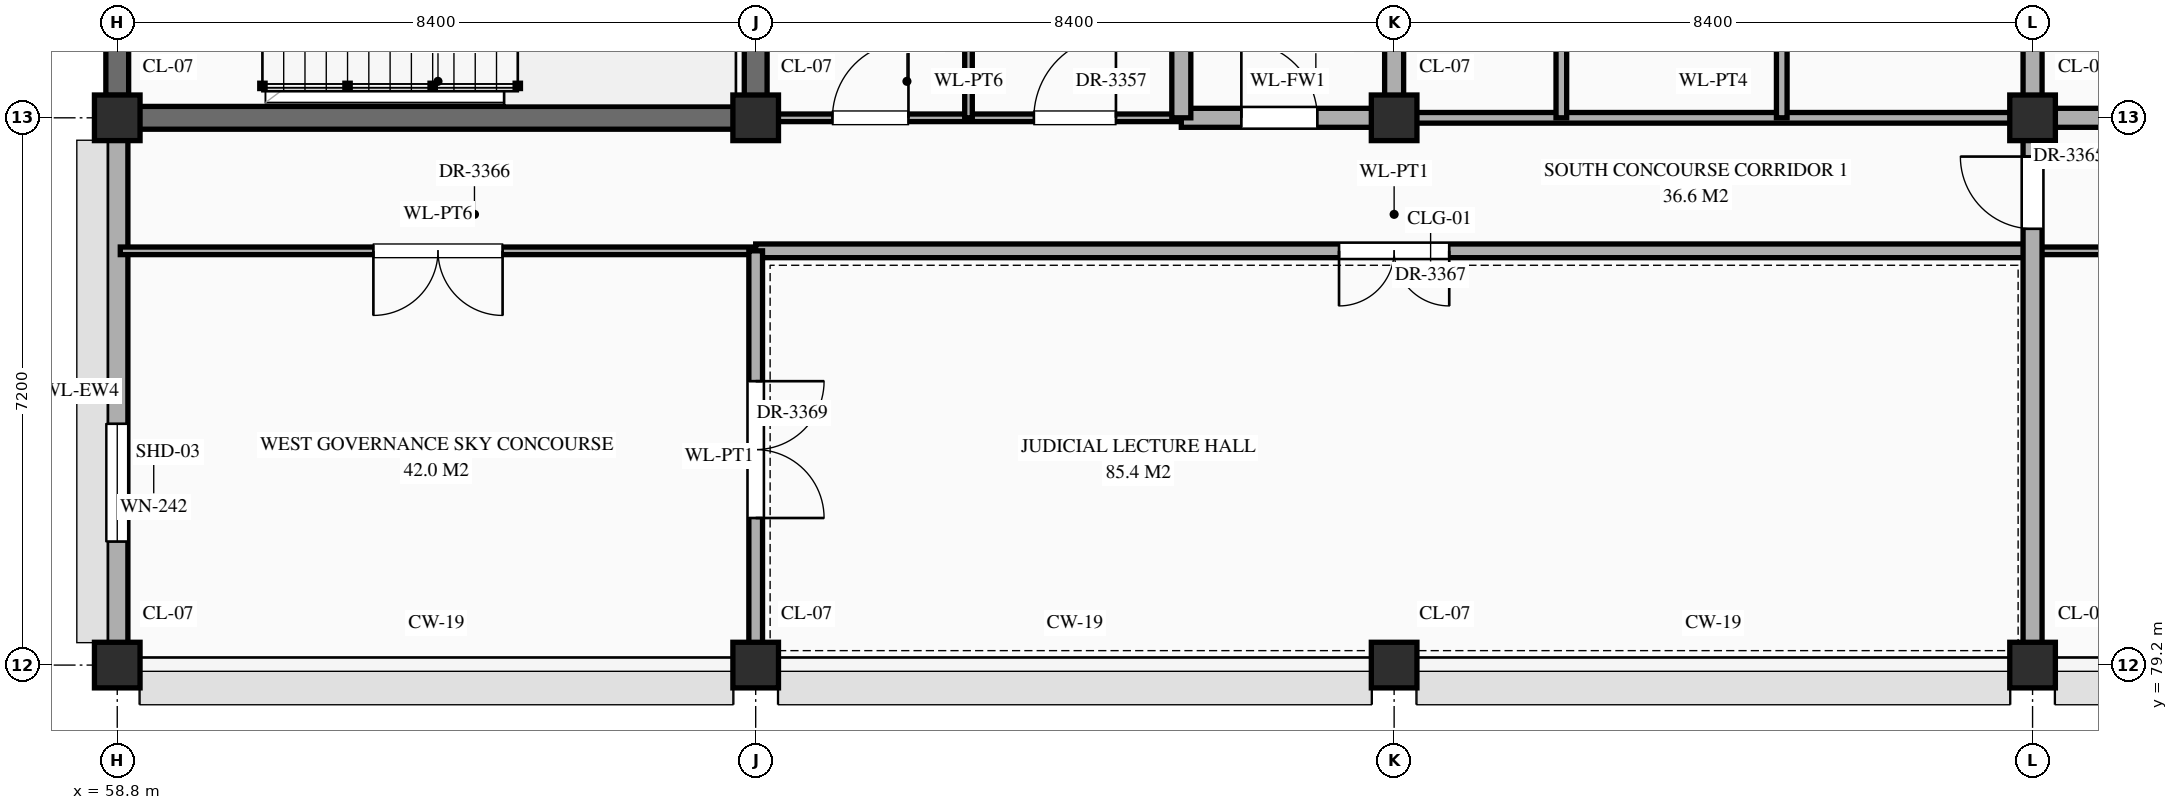
"""IFC4 building model, lengths in metres.
Left out: names, types, materials, properties, quantities, classifications, styles, units other than length and angle.
Written with IfcOpenShell. Run it as: python <this file> out.ifc"""

import sys

from ifc_helpers import new_model, si_unit, direction, frame, frame_2d, origin, origin_2d, place, context, subcontext, project, spatial, rectangle, extrude, element, fill, save


model = new_model("IFC4")
c1 = context("Model", 3, precision=1e-05, world=origin(), true_north=direction((0.0, 1.0)))
c2 = subcontext(c1, "Body", "Model", "MODEL_VIEW")
j1 = project(units=[si_unit("LENGTHUNIT", "METRE"), si_unit("PLANEANGLEUNIT", "RADIAN")], contexts=[c1])
p1 = place(None, origin())
s1 = spatial("IfcSite", under=j1, at=p1, CompositionType="ELEMENT")
p2 = place(p1, origin())
s2 = spatial("IfcBuilding", under=s1, at=p2, CompositionType="ELEMENT")
p3 = place(p2, frame((0.0, 0.0, 64.5)))
s3 = spatial("IfcBuildingStorey", under=s2, at=p3, CompositionType="ELEMENT", Elevation=64.5)
for number, where, z_axis, x_axis in (
    (1, (58.8, 79.2, 0.0), (0.0, 0.0, 1.0), (1.0, 0.0, 0.0)),
    (2, (58.8, 86.4, 0.0), (0.0, 0.0, 1.0), (1.0, 0.0, 0.0)),
    (3, (67.2, 79.2, 0.0), (0.0, 0.0, 1.0), (1.0, 0.0, 0.0)),
    (4, (67.2, 86.4, 0.0), (0.0, 0.0, 1.0), (1.0, 0.0, 0.0)),
    (5, (75.6, 79.2, 0.0), (0.0, 0.0, 1.0), (1.0, 0.0, 0.0)),
    (6, (75.6, 86.4, 0.0), (0.0, 0.0, 1.0), (1.0, 0.0, 0.0)),
    (7, (84.0, 79.2, 0.0), (0.0, 0.0, 1.0), (1.0, 0.0, 0.0)),
    (8, (84.0, 86.4, 0.0), (0.0, 0.0, 1.0), (1.0, 0.0, 0.0)),
):
    element("IfcColumn", number, at=place(p3, frame(where, z_axis=z_axis, x_axis=x_axis)), inside=s3, PredefinedType="COLUMN", context=c2, shape_type="SweptSolid", body=[
        extrude(rectangle(XDim=0.6, YDim=0.6, at=origin_2d()), origin(), (0.0, 0.0, 1.0), 4.2),
    ])
p4 = place(p3, frame((58.8, 79.495, 0.0), z_axis=(0.0, 0.0, 1.0), x_axis=(0.0, 1.0, 0.0)))
e9 = element("IfcWall", 9, at=p4, inside=s3, PredefinedType="STANDARD", context=c2, shape_type="SweptSolid", body=[
    extrude(rectangle(XDim=6.61, YDim=0.28, at=frame_2d((3.305, 0.0))), origin(), (0.0, 0.0, 1.0), 3.2),
])
p5 = place(p4, frame((1.33, 0.0, 0.85)))
e10 = element("IfcOpeningElement", 10, at=p5, cuts=e9, PredefinedType="OPENING", context=c2, shape_type="SweptSolid", body=[
    extrude(rectangle(XDim=1.55, YDim=1.38, at=frame_2d((0.775, 0.69))), frame((0.0, 0.152, 0.0), z_axis=(0.0, -1.0, 0.0), x_axis=(1.0, 0.0, 0.0)), (0.0, 0.0, 1.0), 0.304),
])
p6 = place(p3, frame((58.8, 86.695, 0.0), z_axis=(0.0, 0.0, 1.0), x_axis=(0.0, 1.0, 0.0)))
e11 = element("IfcWall", 11, at=p6, inside=s3, PredefinedType="SHEAR", context=c2, shape_type="SweptSolid", body=[
    extrude(rectangle(XDim=6.61, YDim=0.3, at=frame_2d((3.305, 0.0))), origin(), (0.0, 0.0, 1.0), 3.95),
])
p7 = place(p3, frame((58.84, 84.65, 0.0), z_axis=(0.0, 0.0, 1.0), x_axis=(1.0, 0.0, 0.0)))
e12 = element("IfcWall", 12, at=p7, inside=s3, PredefinedType="STANDARD", context=c2, shape_type="SweptSolid", body=[
    extrude(rectangle(XDim=8.36, YDim=0.1, at=frame_2d((4.18, 0.0))), origin(), (0.0, 0.0, 1.0), 3.85),
])
p8 = place(p7, frame((3.33, 0.0, 0.0)))
e13 = element("IfcOpeningElement", 13, at=p8, cuts=e12, PredefinedType="OPENING", context=c2, shape_type="SweptSolid", body=[
    extrude(rectangle(XDim=1.7, YDim=2.45, at=frame_2d((0.85, 1.225))), frame((0.0, 0.062, 0.0), z_axis=(0.0, -1.0, 0.0), x_axis=(1.0, 0.0, 0.0)), (0.0, 0.0, 1.0), 0.124),
])
p9 = place(p3, frame((67.2, 84.65, 0.0), z_axis=(0.0, 0.0, 1.0), x_axis=(1.0, 0.0, 0.0)))
e14 = element("IfcWall", 14, at=p9, inside=s3, PredefinedType="STANDARD", context=c2, shape_type="SweptSolid", body=[
    extrude(rectangle(XDim=16.8, YDim=0.18, at=frame_2d((8.4, 0.0))), origin(), (0.0, 0.0, 1.0), 3.85),
])
p10 = place(p9, frame((7.675, 0.0, 0.0)))
e15 = element("IfcOpeningElement", 15, at=p10, cuts=e14, PredefinedType="OPENING", context=c2, shape_type="SweptSolid", body=[
    extrude(rectangle(XDim=1.45, YDim=2.3, at=frame_2d((0.725, 1.15))), frame((0.0, 0.102, 0.0), z_axis=(0.0, -1.0, 0.0), x_axis=(1.0, 0.0, 0.0)), (0.0, 0.0, 1.0), 0.204),
])
p11 = place(p3, frame((84.0, 84.65, 0.0), z_axis=(0.0, 0.0, 1.0), x_axis=(1.0, 0.0, 0.0)))
e16 = element("IfcWall", 16, at=p11, inside=s3, PredefinedType="STANDARD", context=c2, shape_type="SweptSolid", body=[
    extrude(rectangle(XDim=25.16, YDim=0.1, at=frame_2d((12.58, 0.0))), origin(), (0.0, 0.0, 1.0), 3.85),
])
p12 = place(p11, frame((11.63, 0.0, 0.0)))
e17 = element("IfcOpeningElement", 17, at=p12, cuts=e16, PredefinedType="OPENING", context=c2, shape_type="SweptSolid", body=[
    extrude(rectangle(XDim=1.9, YDim=2.5, at=frame_2d((0.95, 1.25))), frame((0.0, 0.062, 0.0), z_axis=(0.0, -1.0, 0.0), x_axis=(1.0, 0.0, 0.0)), (0.0, 0.0, 1.0), 0.124),
])
p13 = place(p3, frame((58.84, 86.4, 0.0), z_axis=(0.0, 0.0, 1.0), x_axis=(1.0, 0.0, 0.0)))
e18 = element("IfcWall", 18, at=p13, inside=s3, PredefinedType="SHEAR", context=c2, shape_type="SweptSolid", body=[
    extrude(rectangle(XDim=8.36, YDim=0.3, at=frame_2d((4.18, 0.0))), origin(), (0.0, 0.0, 1.0), 3.85),
])
p14 = place(p3, frame((67.2, 86.4, 0.0), z_axis=(0.0, 0.0, 1.0), x_axis=(1.0, 0.0, 0.0)))
e19 = element("IfcWall", 19, at=p14, inside=s3, PredefinedType="STANDARD", context=c2, shape_type="SweptSolid", body=[
    extrude(rectangle(XDim=5.6, YDim=0.1, at=frame_2d((2.8, 0.0))), origin(), (0.0, 0.0, 1.0), 3.0),
])
p15 = place(p14, frame((1.01, 0.0, 0.0)))
e20 = element("IfcOpeningElement", 20, at=p15, cuts=e19, PredefinedType="OPENING", context=c2, shape_type="SweptSolid", body=[
    extrude(rectangle(XDim=1.0, YDim=2.25, at=frame_2d((0.5, 1.125))), frame((0.0, 0.062, 0.0), z_axis=(0.0, -1.0, 0.0), x_axis=(1.0, 0.0, 0.0)), (0.0, 0.0, 1.0), 0.124),
])
p16 = place(p14, frame((3.66, 0.0, 0.0)))
e21 = element("IfcOpeningElement", 21, at=p16, cuts=e19, PredefinedType="OPENING", context=c2, shape_type="SweptSolid", body=[
    extrude(rectangle(XDim=1.08, YDim=2.25, at=frame_2d((0.54, 1.125))), frame((0.0, 0.062, 0.0), z_axis=(0.0, -1.0, 0.0), x_axis=(1.0, 0.0, 0.0)), (0.0, 0.0, 1.0), 0.124),
])
p17 = place(p3, frame((72.8, 86.4, 0.0), z_axis=(0.0, 0.0, 1.0), x_axis=(1.0, 0.0, 0.0)))
e22 = element("IfcWall", 22, at=p17, inside=s3, PredefinedType="STANDARD", context=c2, shape_type="SweptSolid", body=[
    extrude(rectangle(XDim=2.8, YDim=0.25, at=frame_2d((1.4, 0.0))), origin(), (0.0, 0.0, 1.0), 3.0),
])
p18 = place(p17, frame((0.79, 0.0, 0.0)))
e23 = element("IfcOpeningElement", 23, at=p18, cuts=e22, PredefinedType="OPENING", context=c2, shape_type="SweptSolid", body=[
    extrude(rectangle(XDim=1.0, YDim=2.2, at=frame_2d((0.5, 1.1))), frame((0.0, 0.137, 0.0), z_axis=(0.0, -1.0, 0.0), x_axis=(1.0, 0.0, 0.0)), (0.0, 0.0, 1.0), 0.274),
])
p19 = place(p3, frame((75.6, 86.4, 0.0), z_axis=(0.0, 0.0, 1.0), x_axis=(1.0, 0.0, 0.0)))
e24 = element("IfcWall", 24, at=p19, inside=s3, PredefinedType="STANDARD", context=c2, shape_type="SweptSolid", body=[
    extrude(rectangle(XDim=8.4, YDim=0.14, at=frame_2d((4.2, 0.0))), origin(), (0.0, 0.0, 1.0), 3.0),
])
p20 = place(p3, frame((84.0, 86.4, 0.0), z_axis=(0.0, 0.0, 1.0), x_axis=(1.0, 0.0, 0.0)))
e25 = element("IfcWall", 25, at=p20, inside=s3, PredefinedType="STANDARD", context=c2, shape_type="SweptSolid", body=[
    extrude(rectangle(XDim=8.4, YDim=0.25, at=frame_2d((4.2, 0.0))), origin(), (0.0, 0.0, 1.0), 3.0),
])
p21 = place(p20, frame((3.725, 0.0, 0.0)))
e26 = element("IfcOpeningElement", 26, at=p21, cuts=e25, PredefinedType="OPENING", context=c2, shape_type="SweptSolid", body=[
    extrude(rectangle(XDim=0.95, YDim=2.15, at=frame_2d((0.475, 1.075))), frame((0.0, 0.137, 0.0), z_axis=(0.0, -1.0, 0.0), x_axis=(1.0, 0.0, 0.0)), (0.0, 0.0, 1.0), 0.274),
])
p22 = place(p3, frame((67.2, 79.24, 0.0), z_axis=(0.0, 0.0, 1.0), x_axis=(0.0, 1.0, 0.0)))
e27 = element("IfcWall", 27, at=p22, inside=s3, PredefinedType="STANDARD", context=c2, shape_type="SweptSolid", body=[
    extrude(rectangle(XDim=5.41, YDim=0.18, at=frame_2d((2.705, 0.0))), origin(), (0.0, 0.0, 1.0), 3.1),
])
p23 = place(p22, frame((1.895, 0.0, 0.0)))
e28 = element("IfcOpeningElement", 28, at=p23, cuts=e27, PredefinedType="OPENING", context=c2, shape_type="SweptSolid", body=[
    extrude(rectangle(XDim=1.8, YDim=2.5, at=frame_2d((0.9, 1.25))), frame((0.0, 0.102, 0.0), z_axis=(0.0, -1.0, 0.0), x_axis=(1.0, 0.0, 0.0)), (0.0, 0.0, 1.0), 0.204),
])
p24 = place(p3, frame((67.2, 86.4, 0.0), z_axis=(0.0, 0.0, 1.0), x_axis=(0.0, 1.0, 0.0)))
e29 = element("IfcWall", 29, at=p24, inside=s3, PredefinedType="SHEAR", context=c2, shape_type="SweptSolid", body=[
    extrude(rectangle(XDim=4.8, YDim=0.3, at=frame_2d((2.4, 0.0))), origin(), (0.0, 0.0, 1.0), 3.95),
])
p25 = place(p3, frame((70.0, 86.4, 0.0), z_axis=(0.0, 0.0, 1.0), x_axis=(0.0, 1.0, 0.0)))
e30 = element("IfcWall", 30, at=p25, inside=s3, PredefinedType="STANDARD", context=c2, shape_type="SweptSolid", body=[
    extrude(rectangle(XDim=7.2, YDim=0.1, at=frame_2d((3.6, 0.0))), origin(), (0.0, 0.0, 1.0), 3.95),
])
p26 = place(p25, frame((3.12, 0.0, 0.0)))
e31 = element("IfcOpeningElement", 31, at=p26, cuts=e30, PredefinedType="OPENING", context=c2, shape_type="SweptSolid", body=[
    extrude(rectangle(XDim=0.96, YDim=2.2, at=frame_2d((0.48, 1.1))), frame((0.0, 0.062, 0.0), z_axis=(0.0, -1.0, 0.0), x_axis=(1.0, 0.0, 0.0)), (0.0, 0.0, 1.0), 0.124),
])
p27 = place(p3, frame((72.8, 86.4, 0.0), z_axis=(0.0, 0.0, 1.0), x_axis=(0.0, 1.0, 0.0)))
e32 = element("IfcWall", 32, at=p27, inside=s3, PredefinedType="STANDARD", context=c2, shape_type="SweptSolid", body=[
    extrude(rectangle(XDim=7.2, YDim=0.25, at=frame_2d((3.6, 0.0))), origin(), (0.0, 0.0, 1.0), 3.95),
])
p28 = place(p27, frame((3.125, 0.0, 0.0)))
e33 = element("IfcOpeningElement", 33, at=p28, cuts=e32, PredefinedType="OPENING", context=c2, shape_type="SweptSolid", body=[
    extrude(rectangle(XDim=0.95, YDim=2.15, at=frame_2d((0.475, 1.075))), frame((0.0, 0.137, 0.0), z_axis=(0.0, -1.0, 0.0), x_axis=(1.0, 0.0, 0.0)), (0.0, 0.0, 1.0), 0.274),
])
p29 = place(p3, frame((75.6, 86.4, 0.0), z_axis=(0.0, 0.0, 1.0), x_axis=(0.0, 1.0, 0.0)))
e34 = element("IfcWall", 34, at=p29, inside=s3, PredefinedType="STANDARD", context=c2, shape_type="SweptSolid", body=[
    extrude(rectangle(XDim=7.2, YDim=0.25, at=frame_2d((3.6, 0.0))), origin(), (0.0, 0.0, 1.0), 3.2),
])
p30 = place(p29, frame((5.34, 0.0, 0.0)))
e35 = element("IfcOpeningElement", 35, at=p30, cuts=e34, PredefinedType="OPENING", context=c2, shape_type="SweptSolid", body=[
    extrude(rectangle(XDim=1.1, YDim=2.2, at=frame_2d((0.55, 1.1))), frame((0.0, 0.137, 0.0), z_axis=(0.0, -1.0, 0.0), x_axis=(1.0, 0.0, 0.0)), (0.0, 0.0, 1.0), 0.274),
])
for number, where, z_axis, x_axis in (
    (36, (77.8, 86.4, 0.0), (0.0, 0.0, 1.0), (0.0, 1.0, 0.0)),
    (37, (80.7, 86.4, 0.0), (0.0, 0.0, 1.0), (0.0, 1.0, 0.0)),
):
    element("IfcWall", number, at=place(p3, frame(where, z_axis=z_axis, x_axis=x_axis)), inside=s3, PredefinedType="STANDARD", context=c2, shape_type="SweptSolid", body=[
        extrude(rectangle(XDim=4.8, YDim=0.14, at=frame_2d((2.4, 0.0))), origin(), (0.0, 0.0, 1.0), 3.95),
    ])
p31 = place(p3, frame((84.0, 79.24, 0.0), z_axis=(0.0, 0.0, 1.0), x_axis=(0.0, 1.0, 0.0)))
e38 = element("IfcWall", 38, at=p31, inside=s3, PredefinedType="STANDARD", context=c2, shape_type="SweptSolid", body=[
    extrude(rectangle(XDim=25.16, YDim=0.25, at=frame_2d((12.58, 0.0))), origin(), (0.0, 0.0, 1.0), 3.1),
])
p32 = place(p31, frame((22.72, 0.0, 0.0)))
e39 = element("IfcOpeningElement", 39, at=p32, cuts=e38, PredefinedType="OPENING", context=c2, shape_type="SweptSolid", body=[
    extrude(rectangle(XDim=1.5, YDim=2.25, at=frame_2d((0.75, 1.125))), frame((0.0, 0.137, 0.0), z_axis=(0.0, -1.0, 0.0), x_axis=(1.0, 0.0, 0.0)), (0.0, 0.0, 1.0), 0.274),
])
p33 = place(p31, frame((12.55, 0.0, 0.0)))
e40 = element("IfcOpeningElement", 40, at=p33, cuts=e38, PredefinedType="OPENING", context=c2, shape_type="SweptSolid", body=[
    extrude(rectangle(XDim=1.0, YDim=2.2, at=frame_2d((0.5, 1.1))), frame((0.0, 0.137, 0.0), z_axis=(0.0, -1.0, 0.0), x_axis=(1.0, 0.0, 0.0)), (0.0, 0.0, 1.0), 0.274),
])
p34 = place(p31, frame((14.87, 0.0, 0.0)))
e41 = element("IfcOpeningElement", 41, at=p34, cuts=e38, PredefinedType="OPENING", context=c2, shape_type="SweptSolid", body=[
    extrude(rectangle(XDim=0.95, YDim=2.15, at=frame_2d((0.475, 1.075))), frame((0.0, 0.137, 0.0), z_axis=(0.0, -1.0, 0.0), x_axis=(1.0, 0.0, 0.0)), (0.0, 0.0, 1.0), 0.274),
])
p35 = place(p31, frame((5.7, 0.0, 0.0)))
e42 = element("IfcOpeningElement", 42, at=p35, cuts=e38, PredefinedType="OPENING", context=c2, shape_type="SweptSolid", body=[
    extrude(rectangle(XDim=0.95, YDim=2.15, at=frame_2d((0.475, 1.075))), frame((0.0, 0.137, 0.0), z_axis=(0.0, -1.0, 0.0), x_axis=(1.0, 0.0, 0.0)), (0.0, 0.0, 1.0), 0.274),
])
p36 = place(p5, origin())
e43 = element("IfcWindow", 43, at=p36, inside=s3, PartitioningType="SINGLE_PANEL", PredefinedType="WINDOW", context=c2, shape_type="SweptSolid", body=[
    extrude(rectangle(XDim=1.55, YDim=1.38, at=frame_2d((0.775, 0.69))), frame((0.0, 0.03, 0.0), z_axis=(0.0, -1.0, 0.0), x_axis=(1.0, 0.0, 0.0)), (0.0, 0.0, 1.0), 0.06),
])
fill(e10, e43)
p37 = place(p15, origin())
e44 = element("IfcDoor", 44, at=p37, inside=s3, OperationType="SINGLE_SWING_RIGHT", PredefinedType="DOOR", context=c2, shape_type="SweptSolid", body=[
    extrude(rectangle(XDim=1.0, YDim=2.25, at=frame_2d((0.5, 1.125))), frame((0.0, 0.025, 0.0), z_axis=(0.0, -1.0, 0.0), x_axis=(1.0, 0.0, 0.0)), (0.0, 0.0, 1.0), 0.05),
])
fill(e20, e44)
p38 = place(p16, origin())
e45 = element("IfcDoor", 45, at=p38, inside=s3, OperationType="SINGLE_SWING_RIGHT", PredefinedType="DOOR", context=c2, shape_type="SweptSolid", body=[
    extrude(rectangle(XDim=1.08, YDim=2.25, at=frame_2d((0.54, 1.125))), frame((0.0, 0.025, 0.0), z_axis=(0.0, -1.0, 0.0), x_axis=(1.0, 0.0, 0.0)), (0.0, 0.0, 1.0), 0.05),
])
fill(e21, e45)
p39 = place(p18, origin())
e46 = element("IfcDoor", 46, at=p39, inside=s3, OperationType="SINGLE_SWING_LEFT", PredefinedType="DOOR", context=c2, shape_type="SweptSolid", body=[
    extrude(rectangle(XDim=1.0, YDim=2.2, at=frame_2d((0.5, 1.1))), frame((0.0, 0.025, 0.0), z_axis=(0.0, -1.0, 0.0), x_axis=(1.0, 0.0, 0.0)), (0.0, 0.0, 1.0), 0.05),
])
fill(e23, e46)
p40 = place(p35, origin())
e47 = element("IfcDoor", 47, at=p40, inside=s3, OperationType="SINGLE_SWING_RIGHT", PredefinedType="DOOR", context=c2, shape_type="SweptSolid", body=[
    extrude(rectangle(XDim=0.95, YDim=2.15, at=frame_2d((0.475, 1.075))), frame((0.0, 0.025, 0.0), z_axis=(0.0, -1.0, 0.0), x_axis=(1.0, 0.0, 0.0)), (0.0, 0.0, 1.0), 0.05),
])
fill(e42, e47)
p41 = place(p8, frame((1.7, 0.0, 0.0), z_axis=(0.0, 0.0, 1.0), x_axis=(-1.0, 0.0, 0.0)))
e48 = element("IfcDoor", 48, at=p41, inside=s3, OperationType="DOUBLE_DOOR_SINGLE_SWING", PredefinedType="DOOR", context=c2, shape_type="SweptSolid", body=[
    extrude(rectangle(XDim=1.7, YDim=2.45, at=frame_2d((0.85, 1.225))), frame((0.0, 0.025, 0.0), z_axis=(0.0, -1.0, 0.0), x_axis=(1.0, 0.0, 0.0)), (0.0, 0.0, 1.0), 0.05),
])
fill(e13, e48)
p42 = place(p10, frame((1.45, 0.0, 0.0), z_axis=(0.0, 0.0, 1.0), x_axis=(-1.0, 0.0, 0.0)))
e49 = element("IfcDoor", 49, at=p42, inside=s3, OperationType="DOUBLE_DOOR_SINGLE_SWING", PredefinedType="DOOR", context=c2, shape_type="SweptSolid", body=[
    extrude(rectangle(XDim=1.45, YDim=2.3, at=frame_2d((0.725, 1.15))), frame((0.0, 0.025, 0.0), z_axis=(0.0, -1.0, 0.0), x_axis=(1.0, 0.0, 0.0)), (0.0, 0.0, 1.0), 0.05),
])
fill(e15, e49)
p43 = place(p23, frame((1.8, 0.0, 0.0), z_axis=(0.0, 0.0, 1.0), x_axis=(-1.0, 0.0, 0.0)))
e50 = element("IfcDoor", 50, at=p43, inside=s3, OperationType="DOUBLE_DOOR_SINGLE_SWING", PredefinedType="DOOR", context=c2, shape_type="SweptSolid", body=[
    extrude(rectangle(XDim=1.8, YDim=2.5, at=frame_2d((0.9, 1.25))), frame((0.0, 0.025, 0.0), z_axis=(0.0, -1.0, 0.0), x_axis=(1.0, 0.0, 0.0)), (0.0, 0.0, 1.0), 0.05),
])
fill(e28, e50)
save(model, sys.argv[1])
